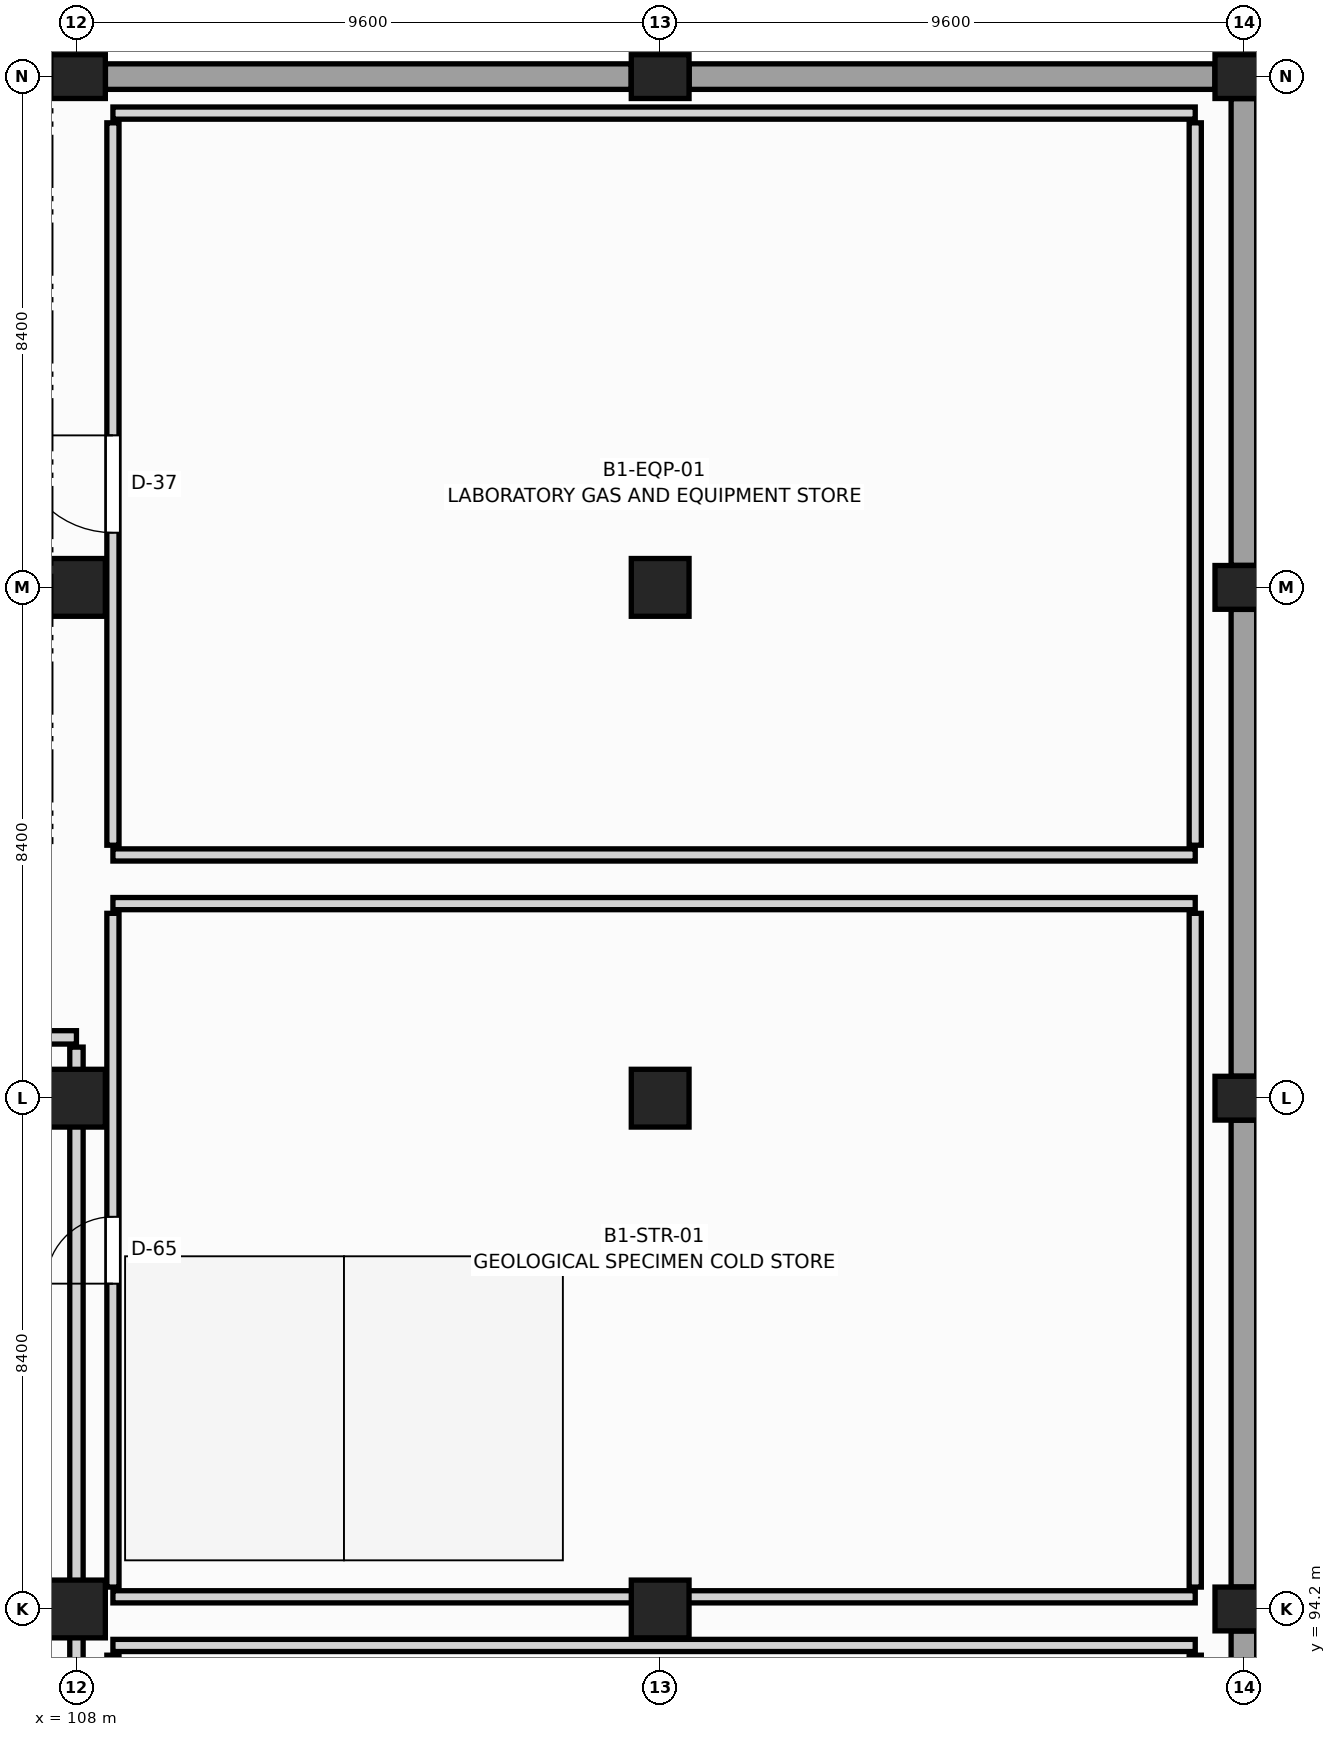
"""IFC4 building model, lengths in metres.
Left out: names, types, materials, properties, quantities, classifications, styles, units other than length and angle.
Written with IfcOpenShell. Run it as: python <this file> out.ifc"""

import sys

from ifc_helpers import new_model, si_unit, direction, frame, frame_2d, origin, origin_2d, place, context, subcontext, project, spatial, rectangle, extrude, element, fill, save


model = new_model("IFC4")
c1 = context("Model", 3, precision=1e-05, world=origin(), true_north=direction((0.0, 1.0)))
c2 = subcontext(c1, "Body", "Model", "MODEL_VIEW")
j1 = project(units=[si_unit("LENGTHUNIT", "METRE"), si_unit("PLANEANGLEUNIT", "RADIAN")], contexts=[c1])
p1 = place(None, origin())
s1 = spatial("IfcSite", under=j1, at=p1, CompositionType="ELEMENT")
p2 = place(p1, origin())
s2 = spatial("IfcBuilding", under=s1, at=p2, CompositionType="ELEMENT")
p3 = place(p2, frame((0.0, 0.0, -4.5)))
s3 = spatial("IfcBuildingStorey", under=s2, at=p3, CompositionType="ELEMENT", Elevation=-4.5)
for number, where, z_axis, x_axis in (
    (1, (108.0, 94.2, 0.0), (0.0, 0.0, 1.0), (1.0, 0.0, 0.0)),
    (2, (108.0, 102.6, 0.0), (0.0, 0.0, 1.0), (1.0, 0.0, 0.0)),
    (3, (108.0, 111.0, 0.0), (0.0, 0.0, 1.0), (1.0, 0.0, 0.0)),
):
    element("IfcColumn", number, at=place(p3, frame(where, z_axis=z_axis, x_axis=x_axis)), inside=s3, PredefinedType="COLUMN", context=c2, shape_type="SweptSolid", body=[
        extrude(rectangle(XDim=0.95, YDim=0.95, at=origin_2d()), origin(), (0.0, 0.0, 1.0), 4.14),
    ])
p4 = place(p3, frame((108.0, 119.4, 0.0), z_axis=(0.0, 0.0, 1.0), x_axis=(1.0, 0.0, 0.0)))
e4 = element("IfcColumn", 4, at=p4, inside=s3, PredefinedType="COLUMN", context=c2, shape_type="SweptSolid", body=[
    extrude(rectangle(XDim=0.95, YDim=0.72, at=origin_2d()), origin(), (0.0, 0.0, 1.0), 4.14),
])
for number, where, z_axis, x_axis in (
    (5, (117.6, 94.2, 0.0), (0.0, 0.0, 1.0), (1.0, 0.0, 0.0)),
    (6, (117.6, 102.6, 0.0), (0.0, 0.0, 1.0), (1.0, 0.0, 0.0)),
    (7, (117.6, 111.0, 0.0), (0.0, 0.0, 1.0), (1.0, 0.0, 0.0)),
):
    element("IfcColumn", number, at=place(p3, frame(where, z_axis=z_axis, x_axis=x_axis)), inside=s3, PredefinedType="COLUMN", context=c2, shape_type="SweptSolid", body=[
        extrude(rectangle(XDim=0.95, YDim=0.95, at=origin_2d()), origin(), (0.0, 0.0, 1.0), 4.14),
    ])
p5 = place(p3, frame((117.6, 119.4, 0.0), z_axis=(0.0, 0.0, 1.0), x_axis=(1.0, 0.0, 0.0)))
e8 = element("IfcColumn", 8, at=p5, inside=s3, PredefinedType="COLUMN", context=c2, shape_type="SweptSolid", body=[
    extrude(rectangle(XDim=0.95, YDim=0.72, at=origin_2d()), origin(), (0.0, 0.0, 1.0), 4.14),
])
for number, where, z_axis, x_axis in (
    (9, (127.2, 94.2, 0.0), (0.0, 0.0, 1.0), (1.0, 0.0, 0.0)),
    (10, (127.2, 102.6, 0.0), (0.0, 0.0, 1.0), (1.0, 0.0, 0.0)),
    (11, (127.2, 111.0, 0.0), (0.0, 0.0, 1.0), (1.0, 0.0, 0.0)),
    (12, (127.2, 119.4, 0.0), (0.0, 0.0, 1.0), (1.0, 0.0, 0.0)),
):
    element("IfcColumn", number, at=place(p3, frame(where, z_axis=z_axis, x_axis=x_axis)), inside=s3, PredefinedType="COLUMN", context=c2, shape_type="SweptSolid", body=[
        extrude(rectangle(XDim=0.95, YDim=0.72, at=origin_2d()), origin(), (0.0, 0.0, 1.0), 4.28),
    ])
p6 = place(p3, frame((127.2, 87.362, 0.0), z_axis=(0.0, 0.0, 1.0), x_axis=(0.0, 1.0, 0.0)))
e13 = element("IfcWall", 13, at=p6, inside=s3, PredefinedType="SOLIDWALL", context=c2, shape_type="SweptSolid", body=[
    extrude(rectangle(XDim=6.476, YDim=0.42, at=frame_2d((3.238, 0.0))), origin(), (0.0, 0.0, 1.0), 4.135),
])
for number, where, z_axis, x_axis in (
    (14, (127.2, 94.562, 0.0), (0.0, 0.0, 1.0), (0.0, 1.0, 0.0)),
    (15, (127.2, 102.962, 0.0), (0.0, 0.0, 1.0), (0.0, 1.0, 0.0)),
    (16, (127.2, 111.362, 0.0), (0.0, 0.0, 1.0), (0.0, 1.0, 0.0)),
):
    element("IfcWall", number, at=place(p3, frame(where, z_axis=z_axis, x_axis=x_axis)), inside=s3, PredefinedType="SOLIDWALL", context=c2, shape_type="SweptSolid", body=[
        extrude(rectangle(XDim=7.676, YDim=0.42, at=frame_2d((3.838, 0.0))), origin(), (0.0, 0.0, 1.0), 4.135),
    ])
for number, where, z_axis, x_axis in (
    (17, (108.477, 119.4, 0.0), (0.0, 0.0, 1.0), (1.0, 0.0, 0.0)),
    (18, (118.077, 119.4, 0.0), (0.0, 0.0, 1.0), (1.0, 0.0, 0.0)),
):
    element("IfcWall", number, at=place(p3, frame(where, z_axis=z_axis, x_axis=x_axis)), inside=s3, PredefinedType="SOLIDWALL", context=c2, shape_type="SweptSolid", body=[
        extrude(rectangle(XDim=8.646, YDim=0.42, at=frame_2d((4.323, 0.0))), origin(), (0.0, 0.0, 1.0), 4.135),
    ])
p7 = place(p3, frame((108.6, 93.6, 0.0), z_axis=(0.0, 0.0, 1.0), x_axis=(1.0, 0.0, 0.0)))
e19 = element("IfcWall", 19, at=p7, inside=s3, PredefinedType="PARTITIONING", context=c2, shape_type="SweptSolid", body=[
    extrude(rectangle(XDim=17.8, YDim=0.2, at=frame_2d((8.9, 0.0))), origin(), (0.0, 0.0, 1.0), 3.22),
])
p8 = place(p3, frame((108.6, 78.16, 0.0), z_axis=(0.0, 0.0, 1.0), x_axis=(0.0, 1.0, 0.0)))
e20 = element("IfcWall", 20, at=p8, inside=s3, PredefinedType="PARTITIONING", context=c2, shape_type="SweptSolid", body=[
    extrude(rectangle(XDim=15.28, YDim=0.2, at=frame_2d((7.64, 0.0))), origin(), (0.0, 0.0, 1.0), 3.22),
])
p9 = place(p8, frame((4.598, 0.0, 0.0)))
e21 = element("IfcOpeningElement", 21, at=p9, cuts=e20, PredefinedType="OPENING", context=c2, shape_type="SweptSolid", body=[
    extrude(rectangle(XDim=1.5, YDim=2.2, at=frame_2d((0.75, 1.1))), frame((0.0, 0.11, 0.0), z_axis=(0.0, -1.0, 0.0), x_axis=(1.0, 0.0, 0.0)), (0.0, 0.0, 1.0), 0.22),
])
p10 = place(p3, frame((126.4, 78.16, 0.0), z_axis=(0.0, 0.0, 1.0), x_axis=(0.0, 1.0, 0.0)))
e22 = element("IfcWall", 22, at=p10, inside=s3, PredefinedType="PARTITIONING", context=c2, shape_type="SweptSolid", body=[
    extrude(rectangle(XDim=15.28, YDim=0.2, at=frame_2d((7.64, 0.0))), origin(), (0.0, 0.0, 1.0), 3.22),
])
for number, where, z_axis, x_axis in (
    (23, (108.6, 94.4, 0.0), (0.0, 0.0, 1.0), (1.0, 0.0, 0.0)),
    (24, (108.6, 105.8, 0.0), (0.0, 0.0, 1.0), (1.0, 0.0, 0.0)),
):
    element("IfcWall", number, at=place(p3, frame(where, z_axis=z_axis, x_axis=x_axis)), inside=s3, PredefinedType="PARTITIONING", context=c2, shape_type="SweptSolid", body=[
        extrude(rectangle(XDim=17.8, YDim=0.2, at=frame_2d((8.9, 0.0))), origin(), (0.0, 0.0, 1.0), 3.22),
    ])
p11 = place(p3, frame((108.6, 94.56, 0.0), z_axis=(0.0, 0.0, 1.0), x_axis=(0.0, 1.0, 0.0)))
e25 = element("IfcWall", 25, at=p11, inside=s3, PredefinedType="PARTITIONING", context=c2, shape_type="SweptSolid", body=[
    extrude(rectangle(XDim=11.08, YDim=0.2, at=frame_2d((5.54, 0.0))), origin(), (0.0, 0.0, 1.0), 3.22),
])
p12 = place(p11, frame((4.99, 0.0, 0.0)))
e26 = element("IfcOpeningElement", 26, at=p12, cuts=e25, PredefinedType="OPENING", context=c2, shape_type="SweptSolid", body=[
    extrude(rectangle(XDim=1.1, YDim=2.2, at=frame_2d((0.55, 1.1))), frame((0.0, 0.11, 0.0), z_axis=(0.0, -1.0, 0.0), x_axis=(1.0, 0.0, 0.0)), (0.0, 0.0, 1.0), 0.22),
])
p13 = place(p3, frame((126.4, 94.56, 0.0), z_axis=(0.0, 0.0, 1.0), x_axis=(0.0, 1.0, 0.0)))
e27 = element("IfcWall", 27, at=p13, inside=s3, PredefinedType="PARTITIONING", context=c2, shape_type="SweptSolid", body=[
    extrude(rectangle(XDim=11.08, YDim=0.2, at=frame_2d((5.54, 0.0))), origin(), (0.0, 0.0, 1.0), 3.22),
])
for number, where, z_axis, x_axis in (
    (28, (108.6, 106.6, 0.0), (0.0, 0.0, 1.0), (1.0, 0.0, 0.0)),
    (29, (108.6, 118.8, 0.0), (0.0, 0.0, 1.0), (1.0, 0.0, 0.0)),
):
    element("IfcWall", number, at=place(p3, frame(where, z_axis=z_axis, x_axis=x_axis)), inside=s3, PredefinedType="PARTITIONING", context=c2, shape_type="SweptSolid", body=[
        extrude(rectangle(XDim=17.8, YDim=0.2, at=frame_2d((8.9, 0.0))), origin(), (0.0, 0.0, 1.0), 3.22),
    ])
p14 = place(p3, frame((108.6, 106.76, 0.0), z_axis=(0.0, 0.0, 1.0), x_axis=(0.0, 1.0, 0.0)))
e30 = element("IfcWall", 30, at=p14, inside=s3, PredefinedType="PARTITIONING", context=c2, shape_type="SweptSolid", body=[
    extrude(rectangle(XDim=11.88, YDim=0.2, at=frame_2d((5.94, 0.0))), origin(), (0.0, 0.0, 1.0), 3.22),
])
p15 = place(p14, frame((5.14, 0.0, 0.0)))
e31 = element("IfcOpeningElement", 31, at=p15, cuts=e30, PredefinedType="OPENING", context=c2, shape_type="SweptSolid", body=[
    extrude(rectangle(XDim=1.6, YDim=2.3, at=frame_2d((0.8, 1.15))), frame((0.0, 0.11, 0.0), z_axis=(0.0, -1.0, 0.0), x_axis=(1.0, 0.0, 0.0)), (0.0, 0.0, 1.0), 0.22),
])
p16 = place(p3, frame((126.4, 106.76, 0.0), z_axis=(0.0, 0.0, 1.0), x_axis=(0.0, 1.0, 0.0)))
e32 = element("IfcWall", 32, at=p16, inside=s3, PredefinedType="PARTITIONING", context=c2, shape_type="SweptSolid", body=[
    extrude(rectangle(XDim=11.88, YDim=0.2, at=frame_2d((5.94, 0.0))), origin(), (0.0, 0.0, 1.0), 3.22),
])
p17 = place(p3, frame((58.4, 103.6, 0.0), z_axis=(0.0, 0.0, 1.0), x_axis=(1.0, 0.0, 0.0)))
e33 = element("IfcWall", 33, at=p17, inside=s3, PredefinedType="PARTITIONING", context=c2, shape_type="SweptSolid", body=[
    extrude(rectangle(XDim=49.6, YDim=0.22, at=frame_2d((24.8, 0.0))), origin(), (0.0, 0.0, 1.0), 3.22),
])
p18 = place(p17, frame((24.0, 0.0, 0.0)))
e34 = element("IfcOpeningElement", 34, at=p18, cuts=e33, PredefinedType="OPENING", context=c2, shape_type="SweptSolid", body=[
    extrude(rectangle(XDim=1.6, YDim=2.3, at=frame_2d((0.8, 1.15))), frame((0.0, 0.12, 0.0), z_axis=(0.0, -1.0, 0.0), x_axis=(1.0, 0.0, 0.0)), (0.0, 0.0, 1.0), 0.24),
])
p19 = place(p3, frame((108.0, 78.16, 0.0), z_axis=(0.0, 0.0, 1.0), x_axis=(0.0, 1.0, 0.0)))
e35 = element("IfcWall", 35, at=p19, inside=s3, PredefinedType="PARTITIONING", context=c2, shape_type="SweptSolid", body=[
    extrude(rectangle(XDim=25.28, YDim=0.22, at=frame_2d((12.64, 0.0))), origin(), (0.0, 0.0, 1.0), 3.22),
])
p20 = place(p12, origin())
e36 = element("IfcDoor", 36, at=p20, inside=s3, OperationType="SINGLE_SWING_LEFT", PredefinedType="DOOR", context=c2, shape_type="SweptSolid", body=[
    extrude(rectangle(XDim=1.1, YDim=2.2, at=frame_2d((0.55, 1.1))), frame((0.0, 0.025, 0.0), z_axis=(0.0, -1.0, 0.0), x_axis=(1.0, 0.0, 0.0)), (0.0, 0.0, 1.0), 0.05),
])
fill(e26, e36)
p21 = place(p15, origin())
e37 = element("IfcDoor", 37, at=p21, inside=s3, OperationType="SINGLE_SWING_RIGHT", PredefinedType="DOOR", context=c2, shape_type="SweptSolid", body=[
    extrude(rectangle(XDim=1.6, YDim=2.3, at=frame_2d((0.8, 1.15))), frame((0.0, 0.025, 0.0), z_axis=(0.0, -1.0, 0.0), x_axis=(1.0, 0.0, 0.0)), (0.0, 0.0, 1.0), 0.05),
])
fill(e31, e37)
save(model, sys.argv[1])
